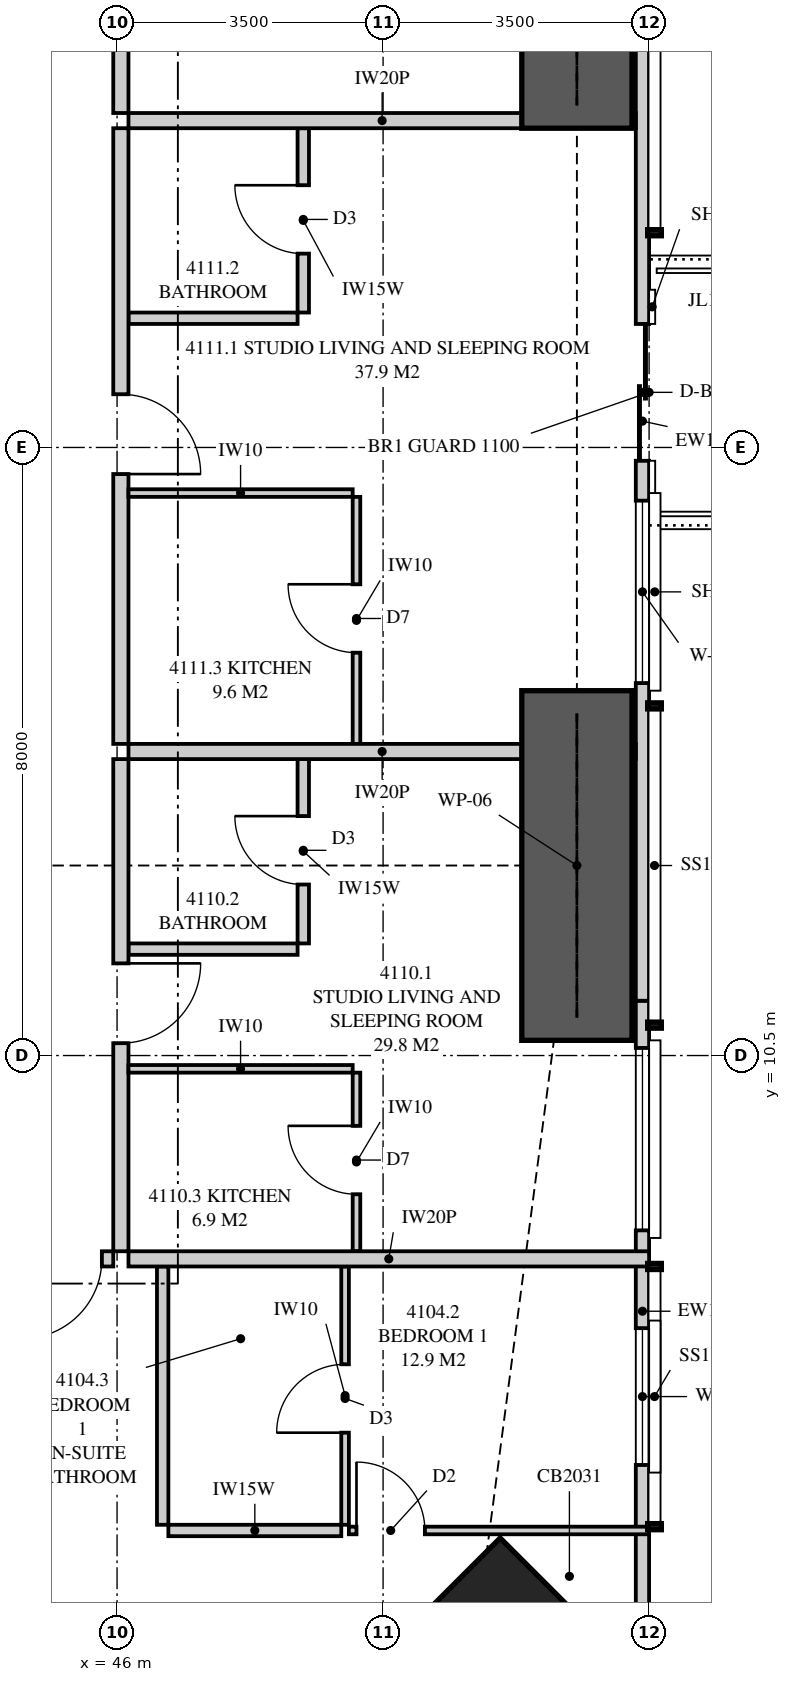
"""IFC4 building model, lengths in metres.
Left out: names, types, materials, properties, quantities, classifications, styles, units other than length and angle.
Written with IfcOpenShell. Run it as: python <this file> out.ifc"""

import sys

from ifc_helpers import new_model, si_unit, direction, frame, frame_2d, origin, origin_2d, place, context, subcontext, project, spatial, polyline, rectangle, hollow_rectangle, outline, extrude, element, fill, save


model = new_model("IFC4")
c1 = context("Model", 3, precision=1e-05, world=origin(), true_north=direction((0.0, 1.0)))
c2 = subcontext(c1, "Body", "Model", "MODEL_VIEW")
j1 = project(units=[si_unit("LENGTHUNIT", "METRE"), si_unit("PLANEANGLEUNIT", "RADIAN")], contexts=[c1])
p1 = place(None, origin())
s1 = spatial("IfcSite", under=j1, at=p1, CompositionType="ELEMENT")
p2 = place(p1, origin())
s2 = spatial("IfcBuilding", under=s1, at=p2, CompositionType="ELEMENT")
p3 = place(p2, frame((0.0, 0.0, 154.35)))
s3 = spatial("IfcBuildingStorey", under=s2, at=p3, CompositionType="ELEMENT", Elevation=154.35)
p4 = place(p3, frame((50.652, 2.348, 0.0), z_axis=(0.0, 0.0, 1.0), x_axis=(-0.707106781187, 0.707106781187, 0.0)))
e1 = element("IfcColumn", 1, at=p4, inside=s3, PredefinedType="COLUMN", context=c2, shape_type="SweptSolid", body=[
    extrude(hollow_rectangle(XDim=2.0, YDim=3.1, WallThickness=0.125, at=origin_2d()), origin(), (0.0, 0.0, 1.0), 3.35),
])
p5 = place(p3, frame((52.913, 3.051, 0.0), z_axis=(0.0, 0.0, 1.0), x_axis=(0.0, 1.0, 0.0)))
e2 = element("IfcWall", 2, at=p5, inside=s3, PredefinedType="SOLIDWALL", context=c2, shape_type="SweptSolid", body=[
    extrude(rectangle(XDim=8.17, YDim=0.175, at=frame_2d((4.085, 0.0))), origin(), (0.0, 0.0, 1.0), 3.11),
])
p6 = place(p5, frame((2.062, 0.0, 0.4)))
e3 = element("IfcOpeningElement", 3, at=p6, cuts=e2, PredefinedType="OPENING", context=c2, shape_type="SweptSolid", body=[
    extrude(rectangle(XDim=1.8, YDim=1.7, at=frame_2d((0.9, 0.85))), frame((0.0, 0.097, 0.0), z_axis=(0.0, -1.0, 0.0), x_axis=(1.0, 0.0, 0.0)), (0.0, 0.0, 1.0), 0.195),
])
p7 = place(p5, frame((5.149, 0.0, 0.4)))
e4 = element("IfcOpeningElement", 4, at=p7, cuts=e2, PredefinedType="OPENING", context=c2, shape_type="SweptSolid", body=[
    extrude(rectangle(XDim=2.4, YDim=1.7, at=frame_2d((1.2, 0.85))), frame((0.0, 0.097, 0.0), z_axis=(0.0, -1.0, 0.0), x_axis=(1.0, 0.0, 0.0)), (0.0, 0.0, 1.0), 0.195),
])
p8 = place(p3, frame((52.913, 11.221, 0.0), z_axis=(0.0, 0.0, 1.0), x_axis=(0.0, 1.0, 0.0)))
e5 = element("IfcWall", 5, at=p8, inside=s3, PredefinedType="SOLIDWALL", context=c2, shape_type="SweptSolid", body=[
    extrude(rectangle(XDim=15.251, YDim=0.175, at=frame_2d((7.625, 0.0))), origin(), (0.0, 0.0, 1.0), 2.15),
])
p9 = place(p8, frame((7.104, 0.0, 0.0)))
e6 = element("IfcOpeningElement", 6, at=p9, cuts=e5, PredefinedType="OPENING", context=c2, shape_type="SweptSolid", body=[
    extrude(rectangle(XDim=1.8, YDim=2.1, at=frame_2d((0.9, 1.05))), frame((0.0, 0.097, 0.0), z_axis=(0.0, -1.0, 0.0), x_axis=(1.0, 0.0, 0.0)), (0.0, 0.0, 1.0), 0.195),
])
p10 = place(p8, frame((4.179, 0.0, 0.4)))
e7 = element("IfcOpeningElement", 7, at=p10, cuts=e5, PredefinedType="OPENING", context=c2, shape_type="SweptSolid", body=[
    extrude(rectangle(XDim=2.4, YDim=1.7, at=frame_2d((1.2, 0.85))), frame((0.0, 0.097, 0.0), z_axis=(0.0, -1.0, 0.0), x_axis=(1.0, 0.0, 0.0)), (0.0, 0.0, 1.0), 0.195),
])
p11 = place(p3, frame((41.2, 7.825, 0.0), z_axis=(0.0, 0.0, 1.0), x_axis=(1.0, 0.0, 0.0)))
e8 = element("IfcWall", 8, at=p11, inside=s3, PredefinedType="PARTITIONING", context=c2, shape_type="SweptSolid", body=[
    extrude(outline(polyline([(0.0, 0.0), (4.75, 0.0), (4.75, 3.11), (1.896, 3.11), (1.896, 2.531), (1.204, 2.531), (1.204, 3.11), (0.0, 3.11), (0.0, 0.0)])), frame((0.0, 0.1, 0.0), z_axis=(0.0, -1.0, 0.0), x_axis=(1.0, 0.0, 0.0)), (0.0, 0.0, 1.0), 0.2),
])
p12 = place(p11, frame((3.55, 0.0, 0.0)))
e9 = element("IfcOpeningElement", 9, at=p12, cuts=e8, PredefinedType="OPENING", context=c2, shape_type="SweptSolid", body=[
    extrude(rectangle(XDim=1.05, YDim=2.2, at=frame_2d((0.525, 1.1))), frame((0.0, 0.11, 0.0), z_axis=(0.0, -1.0, 0.0), x_axis=(1.0, 0.0, 0.0)), (0.0, 0.0, 1.0), 0.22),
])
p13 = place(p3, frame((49.0, 4.327, 0.0), z_axis=(0.0, 0.0, 1.0), x_axis=(0.0, 1.0, 0.0)))
e10 = element("IfcWall", 10, at=p13, inside=s3, PredefinedType="PARTITIONING", context=c2, shape_type="SweptSolid", body=[
    extrude(rectangle(XDim=3.398, YDim=0.1, at=frame_2d((1.699, 0.0))), origin(), (0.0, 0.0, 1.0), 3.11),
])
p14 = place(p13, frame((1.212, 0.0, 0.0)))
e11 = element("IfcOpeningElement", 11, at=p14, cuts=e10, PredefinedType="OPENING", context=c2, shape_type="SweptSolid", body=[
    extrude(rectangle(XDim=0.9, YDim=2.1, at=frame_2d((0.45, 1.05))), frame((0.0, 0.06, 0.0), z_axis=(0.0, -1.0, 0.0), x_axis=(1.0, 0.0, 0.0)), (0.0, 0.0, 1.0), 0.12),
])
p15 = place(p3, frame((49.05, 4.252, 0.0), z_axis=(0.0, 0.0, 1.0), x_axis=(1.0, 0.0, 0.0)))
e12 = element("IfcWall", 12, at=p15, inside=s3, PredefinedType="PARTITIONING", context=c2, shape_type="SweptSolid", body=[
    extrude(outline(polyline([(0.782, 3.11), (0.0, 3.11), (0.0, 0.0), (2.451, 0.0), (2.639, 0.458), (2.73, 0.427), (2.811, 0.394), (2.811, 0.0), (3.95, 0.0), (3.95, 3.11), (2.92, 3.11), (2.92, 2.15), (0.782, 2.15), (0.782, 3.11)])), frame((0.0, 0.05, 0.0), z_axis=(0.0, -1.0, 0.0), x_axis=(1.0, 0.0, 0.0)), (0.0, 0.0, 1.0), 0.1),
])
p16 = place(p15, frame((0.1, 0.0, 0.0)))
e13 = element("IfcOpeningElement", 13, at=p16, cuts=e12, PredefinedType="OPENING", context=c2, shape_type="SweptSolid", body=[
    extrude(rectangle(XDim=0.9, YDim=2.1, at=frame_2d((0.45, 1.05))), frame((0.0, 0.06, 0.0), z_axis=(0.0, -1.0, 0.0), x_axis=(1.0, 0.0, 0.0)), (0.0, 0.0, 1.0), 0.12),
])
p17 = place(p3, frame((46.675, 4.252, 0.0), z_axis=(0.0, 0.0, 1.0), x_axis=(1.0, 0.0, 0.0)))
e14 = element("IfcWall", 14, at=p17, inside=s3, PredefinedType="PLUMBINGWALL", context=c2, shape_type="SweptSolid", body=[
    extrude(rectangle(XDim=2.275, YDim=0.15, at=frame_2d((1.137, 0.0))), origin(), (0.0, 0.0, 1.0), 3.11),
])
p18 = place(p3, frame((46.6, 4.327, 0.0), z_axis=(0.0, 0.0, 1.0), x_axis=(0.0, 1.0, 0.0)))
e15 = element("IfcWall", 15, at=p18, inside=s3, PredefinedType="PLUMBINGWALL", context=c2, shape_type="SweptSolid", body=[
    extrude(rectangle(XDim=3.398, YDim=0.15, at=frame_2d((1.699, 0.0))), origin(), (0.0, 0.0, 1.0), 3.11),
])
p19 = place(p3, frame((46.15, 7.825, 0.0), z_axis=(0.0, 0.0, 1.0), x_axis=(1.0, 0.0, 0.0)))
e16 = element("IfcWall", 16, at=p19, inside=s3, PredefinedType="PARTITIONING", context=c2, shape_type="SweptSolid", body=[
    extrude(outline(polyline([(0.0, 0.0), (6.85, 0.0), (6.85, 3.11), (6.34, 3.11), (6.34, 2.15), (4.101, 2.15), (4.101, 3.11), (0.0, 3.11), (0.0, 0.0)])), frame((0.0, 0.1, 0.0), z_axis=(0.0, -1.0, 0.0), x_axis=(1.0, 0.0, 0.0)), (0.0, 0.0, 1.0), 0.2),
])
p20 = place(p3, frame((52.825, 14.5, 0.0), z_axis=(0.0, 0.0, 1.0), x_axis=(-1.0, 0.0, 0.0)))
e17 = element("IfcWall", 17, at=p20, inside=s3, PredefinedType="PARTITIONING", context=c2, shape_type="SweptSolid", body=[
    extrude(outline(polyline([(0.529, 2.15), (0.0, 2.15), (0.0, 0.0), (0.529, 0.0), (0.529, 0.17), (1.021, 0.17), (1.021, 0.0), (6.675, 0.0), (6.675, 3.11), (1.885, 3.11), (1.885, 2.15), (1.021, 2.15), (1.021, 1.83), (0.529, 1.83), (0.529, 2.15)])), frame((0.0, 0.1, 0.0), z_axis=(0.0, -1.0, 0.0), x_axis=(1.0, 0.0, 0.0)), (0.0, 0.0, 1.0), 0.2),
])
p21 = place(p3, frame((46.05, 7.925, 0.0), z_axis=(0.0, 0.0, 1.0), x_axis=(0.0, 1.0, 0.0)))
e18 = element("IfcWall", 18, at=p21, inside=s3, PredefinedType="PARTITIONING", context=c2, shape_type="SweptSolid", body=[
    extrude(outline(polyline([(0.0, 0.0), (6.475, 0.0), (6.475, 3.11), (5.421, 3.11), (5.421, 2.531), (4.729, 2.531), (4.729, 3.11), (0.0, 3.11), (0.0, 0.0)])), frame((0.0, 0.1, 0.0), z_axis=(0.0, -1.0, 0.0), x_axis=(1.0, 0.0, 0.0)), (0.0, 0.0, 1.0), 0.2),
])
p22 = place(p21, frame((2.738, 0.0, 0.0)))
e19 = element("IfcOpeningElement", 19, at=p22, cuts=e18, PredefinedType="OPENING", context=c2, shape_type="SweptSolid", body=[
    extrude(rectangle(XDim=1.05, YDim=2.2, at=frame_2d((0.525, 1.1))), frame((0.0, 0.11, 0.0), z_axis=(0.0, -1.0, 0.0), x_axis=(1.0, 0.0, 0.0)), (0.0, 0.0, 1.0), 0.22),
])
p23 = place(p3, frame((48.45, 11.975, 0.0), z_axis=(0.0, 0.0, 1.0), x_axis=(0.0, 1.0, 0.0)))
e20 = element("IfcWall", 20, at=p23, inside=s3, PredefinedType="PLUMBINGWALL", context=c2, shape_type="SweptSolid", body=[
    extrude(outline(polyline([(0.0, 0.0), (2.425, 0.0), (2.425, 3.11), (1.346, 3.11), (1.346, 2.531), (0.704, 2.531), (0.704, 3.11), (0.0, 3.11), (0.0, 0.0)])), frame((0.0, 0.075, 0.0), z_axis=(0.0, -1.0, 0.0), x_axis=(1.0, 0.0, 0.0)), (0.0, 0.0, 1.0), 0.15),
])
p24 = place(p23, frame((0.775, 0.0, 0.0)))
e21 = element("IfcOpeningElement", 21, at=p24, cuts=e20, PredefinedType="OPENING", context=c2, shape_type="SweptSolid", body=[
    extrude(rectangle(XDim=0.9, YDim=2.1, at=frame_2d((0.45, 1.05))), frame((0.0, 0.085, 0.0), z_axis=(0.0, -1.0, 0.0), x_axis=(1.0, 0.0, 0.0)), (0.0, 0.0, 1.0), 0.17),
])
p25 = place(p3, frame((48.375, 11.9, 0.0), z_axis=(0.0, 0.0, 1.0), x_axis=(-1.0, 0.0, 0.0)))
e22 = element("IfcWall", 22, at=p25, inside=s3, PredefinedType="PLUMBINGWALL", context=c2, shape_type="SweptSolid", body=[
    extrude(rectangle(XDim=2.225, YDim=0.15, at=frame_2d((1.113, 0.0))), origin(), (0.0, 0.0, 1.0), 3.11),
])
p26 = place(p3, frame((49.15, 7.925, 0.0), z_axis=(0.0, 0.0, 1.0), x_axis=(0.0, 1.0, 0.0)))
e23 = element("IfcWall", 23, at=p26, inside=s3, PredefinedType="PARTITIONING", context=c2, shape_type="SweptSolid", body=[
    extrude(rectangle(XDim=2.35, YDim=0.1, at=frame_2d((1.175, 0.0))), origin(), (0.0, 0.0, 1.0), 3.11),
])
p27 = place(p26, frame((0.75, 0.0, 0.0)))
e24 = element("IfcOpeningElement", 24, at=p27, cuts=e23, PredefinedType="OPENING", context=c2, shape_type="SweptSolid", body=[
    extrude(rectangle(XDim=0.9, YDim=2.1, at=frame_2d((0.45, 1.05))), frame((0.0, 0.06, 0.0), z_axis=(0.0, -1.0, 0.0), x_axis=(1.0, 0.0, 0.0)), (0.0, 0.0, 1.0), 0.12),
])
p28 = place(p3, frame((49.1, 10.325, 0.0), z_axis=(0.0, 0.0, 1.0), x_axis=(-1.0, 0.0, 0.0)))
e25 = element("IfcWall", 25, at=p28, inside=s3, PredefinedType="PARTITIONING", context=c2, shape_type="SweptSolid", body=[
    extrude(rectangle(XDim=2.95, YDim=0.1, at=frame_2d((1.475, 0.0))), origin(), (0.0, 0.0, 1.0), 3.11),
])
p29 = place(p3, frame((52.825, 22.8, 0.0), z_axis=(0.0, 0.0, 1.0), x_axis=(-1.0, 0.0, 0.0)))
e26 = element("IfcWall", 26, at=p29, inside=s3, PredefinedType="PARTITIONING", context=c2, shape_type="SweptSolid", body=[
    extrude(outline(polyline([(0.0, 0.0), (6.675, 0.0), (6.675, 3.11), (1.885, 3.11), (1.885, 2.15), (0.0, 2.15), (0.0, 3.11), (0.0, 0.0)])), frame((0.0, 0.1, 0.0), z_axis=(0.0, -1.0, 0.0), x_axis=(1.0, 0.0, 0.0)), (0.0, 0.0, 1.0), 0.2),
])
p30 = place(p3, frame((46.05, 14.6, 0.0), z_axis=(0.0, 0.0, 1.0), x_axis=(0.0, 1.0, 0.0)))
e27 = element("IfcWall", 27, at=p30, inside=s3, PredefinedType="PARTITIONING", context=c2, shape_type="SweptSolid", body=[
    extrude(rectangle(XDim=8.1, YDim=0.2, at=frame_2d((4.05, 0.0))), origin(), (0.0, 0.0, 1.0), 3.11),
])
p31 = place(p30, frame((3.55, 0.0, 0.0)))
e28 = element("IfcOpeningElement", 28, at=p31, cuts=e27, PredefinedType="OPENING", context=c2, shape_type="SweptSolid", body=[
    extrude(rectangle(XDim=1.05, YDim=2.2, at=frame_2d((0.525, 1.1))), frame((0.0, 0.11, 0.0), z_axis=(0.0, -1.0, 0.0), x_axis=(1.0, 0.0, 0.0)), (0.0, 0.0, 1.0), 0.22),
])
p32 = place(p3, frame((48.45, 20.275, 0.0), z_axis=(0.0, 0.0, 1.0), x_axis=(0.0, 1.0, 0.0)))
e29 = element("IfcWall", 29, at=p32, inside=s3, PredefinedType="PLUMBINGWALL", context=c2, shape_type="SweptSolid", body=[
    extrude(rectangle(XDim=2.425, YDim=0.15, at=frame_2d((1.212, 0.0))), origin(), (0.0, 0.0, 1.0), 3.11),
])
p33 = place(p32, frame((0.775, 0.0, 0.0)))
e30 = element("IfcOpeningElement", 30, at=p33, cuts=e29, PredefinedType="OPENING", context=c2, shape_type="SweptSolid", body=[
    extrude(rectangle(XDim=0.9, YDim=2.1, at=frame_2d((0.45, 1.05))), frame((0.0, 0.085, 0.0), z_axis=(0.0, -1.0, 0.0), x_axis=(1.0, 0.0, 0.0)), (0.0, 0.0, 1.0), 0.17),
])
p34 = place(p3, frame((48.375, 20.2, 0.0), z_axis=(0.0, 0.0, 1.0), x_axis=(-1.0, 0.0, 0.0)))
e31 = element("IfcWall", 31, at=p34, inside=s3, PredefinedType="PLUMBINGWALL", context=c2, shape_type="SweptSolid", body=[
    extrude(rectangle(XDim=2.225, YDim=0.15, at=frame_2d((1.113, 0.0))), origin(), (0.0, 0.0, 1.0), 3.11),
])
p35 = place(p3, frame((49.15, 14.6, 0.0), z_axis=(0.0, 0.0, 1.0), x_axis=(0.0, 1.0, 0.0)))
e32 = element("IfcWall", 32, at=p35, inside=s3, PredefinedType="PARTITIONING", context=c2, shape_type="SweptSolid", body=[
    extrude(rectangle(XDim=3.25, YDim=0.1, at=frame_2d((1.625, 0.0))), origin(), (0.0, 0.0, 1.0), 3.11),
])
p36 = place(p35, frame((1.2, 0.0, 0.0)))
e33 = element("IfcOpeningElement", 33, at=p36, cuts=e32, PredefinedType="OPENING", context=c2, shape_type="SweptSolid", body=[
    extrude(rectangle(XDim=0.9, YDim=2.1, at=frame_2d((0.45, 1.05))), frame((0.0, 0.06, 0.0), z_axis=(0.0, -1.0, 0.0), x_axis=(1.0, 0.0, 0.0)), (0.0, 0.0, 1.0), 0.12),
])
p37 = place(p3, frame((49.1, 17.9, 0.0), z_axis=(0.0, 0.0, 1.0), x_axis=(-1.0, 0.0, 0.0)))
e34 = element("IfcWall", 34, at=p37, inside=s3, PredefinedType="PARTITIONING", context=c2, shape_type="SweptSolid", body=[
    extrude(rectangle(XDim=2.95, YDim=0.1, at=frame_2d((1.475, 0.0))), origin(), (0.0, 0.0, 1.0), 3.11),
])
p38 = place(p3, frame((46.05, 22.9, 0.0), z_axis=(0.0, 0.0, 1.0), x_axis=(0.0, 1.0, 0.0)))
e35 = element("IfcWall", 35, at=p38, inside=s3, PredefinedType="PARTITIONING", context=c2, shape_type="SweptSolid", body=[
    extrude(outline(polyline([(0.0, 0.0), (6.175, 0.0), (6.175, 3.11), (2.446, 3.11), (2.446, 2.531), (1.754, 2.531), (1.754, 3.11), (0.0, 3.11), (0.0, 0.0)])), frame((0.0, 0.1, 0.0), z_axis=(0.0, -1.0, 0.0), x_axis=(1.0, 0.0, 0.0)), (0.0, 0.0, 1.0), 0.2),
])
p39 = place(p38, frame((2.587, 0.0, 0.0)))
e36 = element("IfcOpeningElement", 36, at=p39, cuts=e35, PredefinedType="OPENING", context=c2, shape_type="SweptSolid", body=[
    extrude(rectangle(XDim=1.05, YDim=2.2, at=frame_2d((0.525, 1.1))), frame((0.0, 0.11, 0.0), z_axis=(0.0, -1.0, 0.0), x_axis=(1.0, 0.0, 0.0)), (0.0, 0.0, 1.0), 0.22),
])
for number, where, z_axis, x_axis in (
    (37, (52.05, 10.7, 0.0), (0.0, 0.0, 1.0), (0.0, 1.0, 0.0)),
    (38, (52.05, 22.7, 0.0), (0.0, 0.0, 1.0), (0.0, 1.0, 0.0)),
):
    element("IfcWall", number, at=place(p3, frame(where, z_axis=z_axis, x_axis=x_axis)), inside=s3, PredefinedType="SHEAR", context=c2, shape_type="SweptSolid", body=[
        extrude(rectangle(XDim=4.6, YDim=1.45, at=frame_2d((2.3, 0.0))), origin(), (0.0, 0.0, 1.0), 3.35),
    ])
p40 = place(p6, origin())
e39 = element("IfcWindow", 39, at=p40, inside=s3, PartitioningType="SINGLE_PANEL", PredefinedType="WINDOW", context=c2, shape_type="SweptSolid", body=[
    extrude(rectangle(XDim=1.8, YDim=1.7, at=frame_2d((0.9, 0.85))), frame((0.0, 0.03, 0.0), z_axis=(0.0, -1.0, 0.0), x_axis=(1.0, 0.0, 0.0)), (0.0, 0.0, 1.0), 0.06),
])
fill(e3, e39)
p41 = place(p7, origin())
e40 = element("IfcWindow", 40, at=p41, inside=s3, PartitioningType="SINGLE_PANEL", PredefinedType="WINDOW", context=c2, shape_type="SweptSolid", body=[
    extrude(rectangle(XDim=2.4, YDim=1.7, at=frame_2d((1.2, 0.85))), frame((0.0, 0.03, 0.0), z_axis=(0.0, -1.0, 0.0), x_axis=(1.0, 0.0, 0.0)), (0.0, 0.0, 1.0), 0.06),
])
fill(e4, e40)
p42 = place(p9, origin())
e41 = element("IfcDoor", 41, at=p42, inside=s3, OperationType="SLIDING_TO_LEFT", PredefinedType="DOOR", context=c2, shape_type="SweptSolid", body=[
    extrude(rectangle(XDim=1.8, YDim=2.1, at=frame_2d((0.9, 1.05))), frame((0.0, 0.025, 0.0), z_axis=(0.0, -1.0, 0.0), x_axis=(1.0, 0.0, 0.0)), (0.0, 0.0, 1.0), 0.05),
])
fill(e6, e41)
p43 = place(p10, origin())
e42 = element("IfcWindow", 42, at=p43, inside=s3, PartitioningType="SINGLE_PANEL", PredefinedType="WINDOW", context=c2, shape_type="SweptSolid", body=[
    extrude(rectangle(XDim=2.4, YDim=1.7, at=frame_2d((1.2, 0.85))), frame((0.0, 0.03, 0.0), z_axis=(0.0, -1.0, 0.0), x_axis=(1.0, 0.0, 0.0)), (0.0, 0.0, 1.0), 0.06),
])
fill(e7, e42)
p44 = place(p12, frame((1.05, 0.0, 0.0), z_axis=(0.0, 0.0, 1.0), x_axis=(-1.0, 0.0, 0.0)))
e43 = element("IfcDoor", 43, at=p44, inside=s3, OperationType="SINGLE_SWING_RIGHT", PredefinedType="DOOR", context=c2, shape_type="SweptSolid", body=[
    extrude(rectangle(XDim=1.05, YDim=2.2, at=frame_2d((0.525, 1.1))), frame((0.0, 0.025, 0.0), z_axis=(0.0, -1.0, 0.0), x_axis=(1.0, 0.0, 0.0)), (0.0, 0.0, 1.0), 0.05),
])
fill(e9, e43)
p45 = place(p16, origin())
e44 = element("IfcDoor", 44, at=p45, inside=s3, OperationType="SINGLE_SWING_LEFT", PredefinedType="DOOR", context=c2, shape_type="SweptSolid", body=[
    extrude(rectangle(XDim=0.9, YDim=2.1, at=frame_2d((0.45, 1.05))), frame((0.0, 0.025, 0.0), z_axis=(0.0, -1.0, 0.0), x_axis=(1.0, 0.0, 0.0)), (0.0, 0.0, 1.0), 0.05),
])
fill(e13, e44)
p46 = place(p14, origin())
e45 = element("IfcDoor", 45, at=p46, inside=s3, OperationType="SINGLE_SWING_LEFT", PredefinedType="DOOR", context=c2, shape_type="SweptSolid", body=[
    extrude(rectangle(XDim=0.9, YDim=2.1, at=frame_2d((0.45, 1.05))), frame((0.0, 0.025, 0.0), z_axis=(0.0, -1.0, 0.0), x_axis=(1.0, 0.0, 0.0)), (0.0, 0.0, 1.0), 0.05),
])
fill(e11, e45)
p47 = place(p22, frame((1.05, 0.0, 0.0), z_axis=(0.0, 0.0, 1.0), x_axis=(-1.0, 0.0, 0.0)))
e46 = element("IfcDoor", 46, at=p47, inside=s3, OperationType="SINGLE_SWING_LEFT", PredefinedType="DOOR", context=c2, shape_type="SweptSolid", body=[
    extrude(rectangle(XDim=1.05, YDim=2.2, at=frame_2d((0.525, 1.1))), frame((0.0, 0.025, 0.0), z_axis=(0.0, -1.0, 0.0), x_axis=(1.0, 0.0, 0.0)), (0.0, 0.0, 1.0), 0.05),
])
fill(e19, e46)
p48 = place(p24, origin())
e47 = element("IfcDoor", 47, at=p48, inside=s3, OperationType="SINGLE_SWING_RIGHT", PredefinedType="DOOR", context=c2, shape_type="SweptSolid", body=[
    extrude(rectangle(XDim=0.9, YDim=2.1, at=frame_2d((0.45, 1.05))), frame((0.0, 0.025, 0.0), z_axis=(0.0, -1.0, 0.0), x_axis=(1.0, 0.0, 0.0)), (0.0, 0.0, 1.0), 0.05),
])
fill(e21, e47)
p49 = place(p27, origin())
e48 = element("IfcDoor", 48, at=p49, inside=s3, OperationType="SINGLE_SWING_RIGHT", PredefinedType="DOOR", context=c2, shape_type="SweptSolid", body=[
    extrude(rectangle(XDim=0.9, YDim=2.1, at=frame_2d((0.45, 1.05))), frame((0.0, 0.025, 0.0), z_axis=(0.0, -1.0, 0.0), x_axis=(1.0, 0.0, 0.0)), (0.0, 0.0, 1.0), 0.05),
])
fill(e24, e48)
p50 = place(p31, frame((1.05, 0.0, 0.0), z_axis=(0.0, 0.0, 1.0), x_axis=(-1.0, 0.0, 0.0)))
e49 = element("IfcDoor", 49, at=p50, inside=s3, OperationType="SINGLE_SWING_RIGHT", PredefinedType="DOOR", context=c2, shape_type="SweptSolid", body=[
    extrude(rectangle(XDim=1.05, YDim=2.2, at=frame_2d((0.525, 1.1))), frame((0.0, 0.025, 0.0), z_axis=(0.0, -1.0, 0.0), x_axis=(1.0, 0.0, 0.0)), (0.0, 0.0, 1.0), 0.05),
])
fill(e28, e49)
p51 = place(p33, origin())
e50 = element("IfcDoor", 50, at=p51, inside=s3, OperationType="SINGLE_SWING_RIGHT", PredefinedType="DOOR", context=c2, shape_type="SweptSolid", body=[
    extrude(rectangle(XDim=0.9, YDim=2.1, at=frame_2d((0.45, 1.05))), frame((0.0, 0.025, 0.0), z_axis=(0.0, -1.0, 0.0), x_axis=(1.0, 0.0, 0.0)), (0.0, 0.0, 1.0), 0.05),
])
fill(e30, e50)
p52 = place(p36, origin())
e51 = element("IfcDoor", 51, at=p52, inside=s3, OperationType="SINGLE_SWING_RIGHT", PredefinedType="DOOR", context=c2, shape_type="SweptSolid", body=[
    extrude(rectangle(XDim=0.9, YDim=2.1, at=frame_2d((0.45, 1.05))), frame((0.0, 0.025, 0.0), z_axis=(0.0, -1.0, 0.0), x_axis=(1.0, 0.0, 0.0)), (0.0, 0.0, 1.0), 0.05),
])
fill(e33, e51)
save(model, sys.argv[1])
